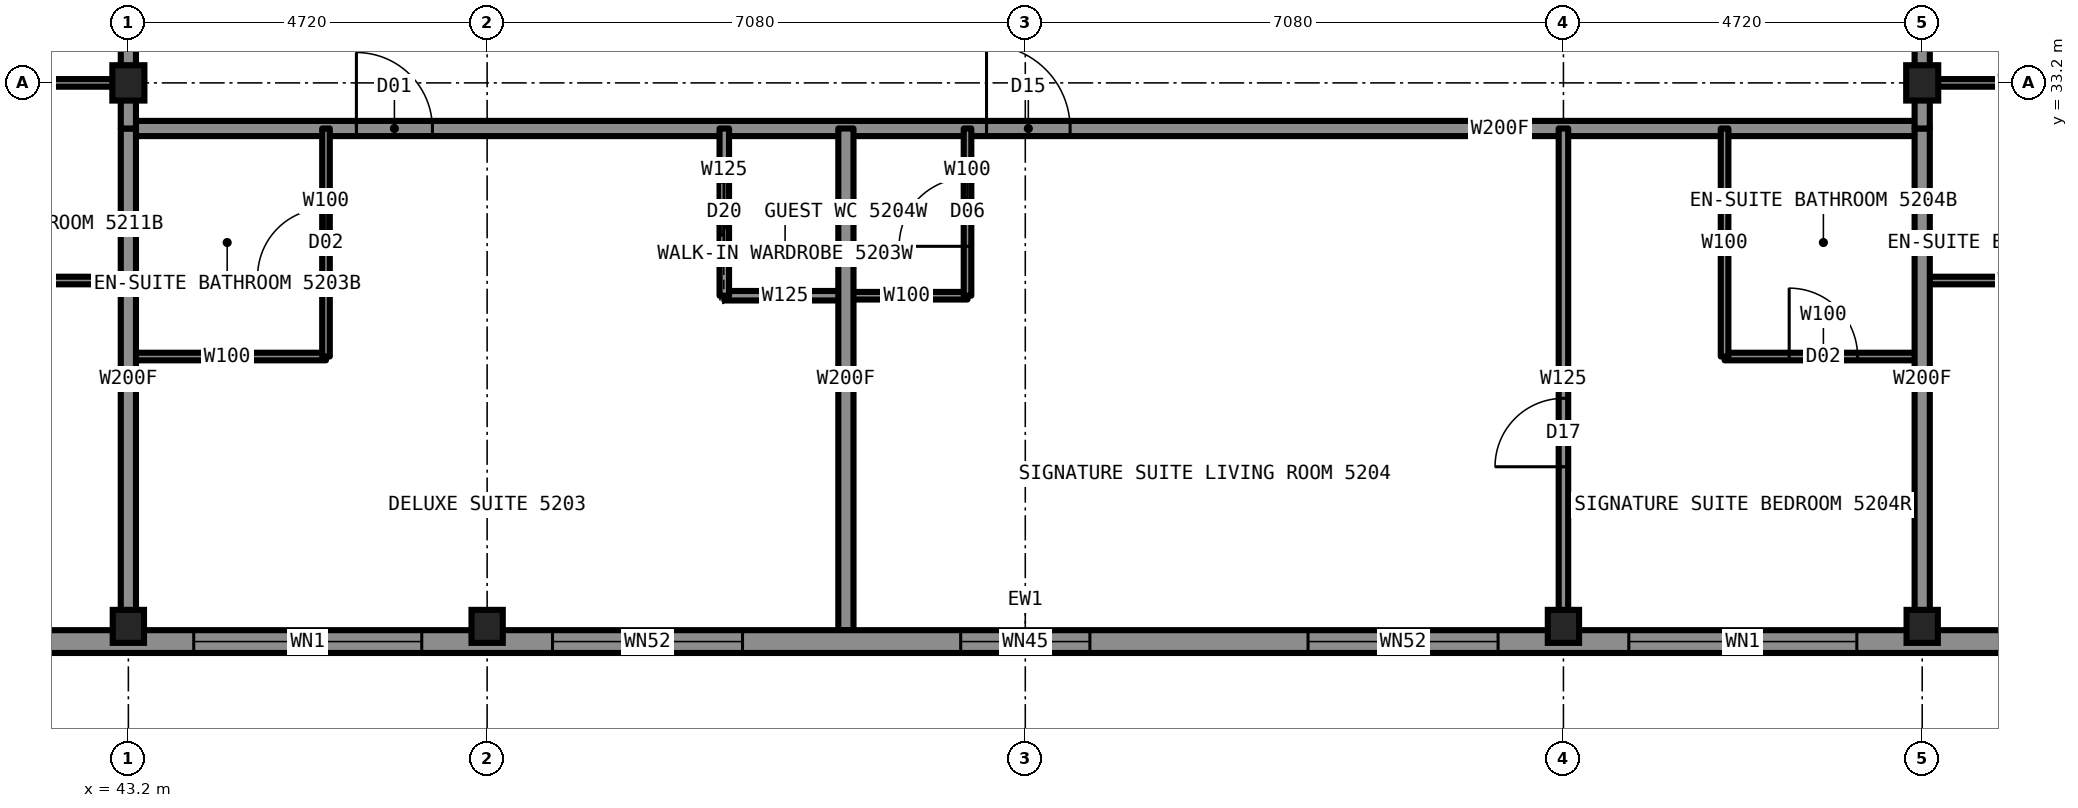
"""IFC4 building model, lengths in metres.
Left out: names, types, materials, properties, quantities, classifications, styles, units other than length and angle.
Written with IfcOpenShell. Run it as: python <this file> out.ifc"""

import sys

from ifc_helpers import new_model, si_unit, direction, frame, frame_2d, origin, origin_2d, place, context, subcontext, project, spatial, rectangle, i_section, extrude, element, fill, save


model = new_model("IFC4")
c1 = context("Model", 3, precision=1e-05, world=origin(), true_north=direction((0.0, 1.0)))
c2 = subcontext(c1, "Body", "Model", "MODEL_VIEW")
j1 = project(units=[si_unit("LENGTHUNIT", "METRE"), si_unit("PLANEANGLEUNIT", "RADIAN")], contexts=[c1])
p1 = place(None, origin())
s1 = spatial("IfcSite", under=j1, at=p1, CompositionType="ELEMENT")
p2 = place(p1, origin())
s2 = spatial("IfcBuilding", under=s1, at=p2, CompositionType="ELEMENT")
p3 = place(p2, frame((0.0, 0.0, 193.3)))
s3 = spatial("IfcBuildingStorey", under=s2, at=p3, CompositionType="ELEMENT", Elevation=193.3)
for number, where, z_axis, x_axis in (
    (1, (43.2, 26.05, 0.0), (0.0, 0.0, 1.0), (1.0, 0.0, 0.0)),
    (2, (47.92, 26.05, 0.0), (0.0, 0.0, 1.0), (1.0, 0.0, 0.0)),
    (3, (62.08, 26.05, 0.0), (0.0, 0.0, 1.0), (1.0, 0.0, 0.0)),
    (4, (66.8, 26.05, 0.0), (0.0, 0.0, 1.0), (1.0, 0.0, 0.0)),
):
    element("IfcColumn", number, at=place(p3, frame(where, z_axis=z_axis, x_axis=x_axis)), inside=s3, PredefinedType="COLUMN", context=c2, shape_type="SweptSolid", body=[
        extrude(i_section(OverallWidth=0.411, OverallDepth=0.434, WebThickness=0.036, FlangeThickness=0.057, at=origin_2d()), origin(), (0.0, 0.0, 1.0), 3.5),
    ])
for number, where, z_axis, x_axis in (
    (5, (43.2, 33.2, 0.0), (0.0, 0.0, 1.0), (1.0, 0.0, 0.0)),
    (6, (66.8, 33.2, 0.0), (0.0, 0.0, 1.0), (1.0, 0.0, 0.0)),
):
    element("IfcColumn", number, at=place(p3, frame(where, z_axis=z_axis, x_axis=x_axis)), inside=s3, PredefinedType="COLUMN", context=c2, shape_type="SweptSolid", body=[
        extrude(i_section(OverallWidth=0.422, OverallDepth=0.465, WebThickness=0.045, FlangeThickness=0.073, at=origin_2d()), origin(), (0.0, 0.0, 1.0), 3.5),
    ])
for number, where, z_axis, x_axis in (
    (7, (40.6, 33.2, 0.0), (0.0, 0.0, 1.0), (1.0, 0.0, 0.0)),
    (8, (66.8, 33.2, 0.0), (0.0, 0.0, 1.0), (1.0, 0.0, 0.0)),
):
    element("IfcWall", number, at=place(p3, frame(where, z_axis=z_axis, x_axis=x_axis)), inside=s3, PredefinedType="PARTITIONING", context=c2, shape_type="SweptSolid", body=[
        extrude(rectangle(XDim=2.6, YDim=0.1, at=frame_2d((1.3, 0.0))), origin(), (0.0, 0.0, 1.0), 2.573),
    ])
p4 = place(p3, frame((43.2, 32.6, 0.0), z_axis=(0.0, 0.0, 1.0), x_axis=(1.0, 0.0, 0.0)))
e9 = element("IfcWall", 9, at=p4, inside=s3, PredefinedType="PARTITIONING", context=c2, shape_type="SweptSolid", body=[
    extrude(rectangle(XDim=23.6, YDim=0.2, at=frame_2d((11.8, 0.0))), origin(), (0.0, 0.0, 1.0), 3.33),
])
p5 = place(p4, frame((3.0, 0.0, 0.0)))
e10 = element("IfcOpeningElement", 10, at=p5, cuts=e9, PredefinedType="OPENING", context=c2, shape_type="SweptSolid", body=[
    extrude(rectangle(XDim=1.0, YDim=2.2, at=frame_2d((0.5, 1.1))), frame((0.0, 0.11, 0.0), z_axis=(0.0, -1.0, 0.0), x_axis=(1.0, 0.0, 0.0)), (0.0, 0.0, 1.0), 0.22),
])
p6 = place(p4, frame((11.29, 0.0, 0.0)))
e11 = element("IfcOpeningElement", 11, at=p6, cuts=e9, PredefinedType="OPENING", context=c2, shape_type="SweptSolid", body=[
    extrude(rectangle(XDim=1.1, YDim=2.2, at=frame_2d((0.55, 1.1))), frame((0.0, 0.11, 0.0), z_axis=(0.0, -1.0, 0.0), x_axis=(1.0, 0.0, 0.0)), (0.0, 0.0, 1.0), 0.22),
])
for number, where, z_axis, x_axis in (
    (12, (40.6, 30.6, 0.0), (0.0, 0.0, 1.0), (1.0, 0.0, 0.0)),
    (13, (66.8, 30.6, 0.0), (0.0, 0.0, 1.0), (1.0, 0.0, 0.0)),
):
    element("IfcWall", number, at=place(p3, frame(where, z_axis=z_axis, x_axis=x_axis)), inside=s3, PredefinedType="PARTITIONING", context=c2, shape_type="SweptSolid", body=[
        extrude(rectangle(XDim=2.6, YDim=0.1, at=frame_2d((1.3, 0.0))), origin(), (0.0, 0.0, 1.0), 3.33),
    ])
p7 = place(p3, frame((52.64, 30.4, 0.0), z_axis=(0.0, 0.0, 1.0), x_axis=(1.0, 0.0, 0.0)))
e14 = element("IfcWall", 14, at=p7, inside=s3, PredefinedType="PARTITIONING", context=c2, shape_type="SweptSolid", body=[
    extrude(rectangle(XDim=1.6, YDim=0.1, at=frame_2d((0.8, 0.0))), origin(), (0.0, 0.0, 1.0), 3.33),
])
p8 = place(p3, frame((51.04, 30.4, 0.0), z_axis=(0.0, 0.0, 1.0), x_axis=(1.0, 0.0, 0.0)))
e15 = element("IfcWall", 15, at=p8, inside=s3, PredefinedType="PARTITIONING", context=c2, shape_type="SweptSolid", body=[
    extrude(rectangle(XDim=1.6, YDim=0.125, at=frame_2d((0.8, 0.0))), origin(), (0.0, 0.0, 1.0), 3.33),
])
p9 = place(p3, frame((43.2, 29.6, 0.0), z_axis=(0.0, 0.0, 1.0), x_axis=(1.0, 0.0, 0.0)))
e16 = element("IfcWall", 16, at=p9, inside=s3, PredefinedType="PARTITIONING", context=c2, shape_type="SweptSolid", body=[
    extrude(rectangle(XDim=2.6, YDim=0.1, at=frame_2d((1.3, 0.0))), origin(), (0.0, 0.0, 1.0), 3.33),
])
p10 = place(p3, frame((64.2, 29.6, 0.0), z_axis=(0.0, 0.0, 1.0), x_axis=(1.0, 0.0, 0.0)))
e17 = element("IfcWall", 17, at=p10, inside=s3, PredefinedType="PARTITIONING", context=c2, shape_type="SweptSolid", body=[
    extrude(rectangle(XDim=2.6, YDim=0.1, at=frame_2d((1.3, 0.0))), origin(), (0.0, 0.0, 1.0), 3.33),
])
p11 = place(p10, frame((0.85, 0.0, 0.0)))
e18 = element("IfcOpeningElement", 18, at=p11, cuts=e17, PredefinedType="OPENING", context=c2, shape_type="SweptSolid", body=[
    extrude(rectangle(XDim=0.9, YDim=2.1, at=frame_2d((0.45, 1.05))), frame((0.0, 0.06, 0.0), z_axis=(0.0, -1.0, 0.0), x_axis=(1.0, 0.0, 0.0)), (0.0, 0.0, 1.0), 0.12),
])
p12 = place(p3, frame((54.24, 30.4, 0.0), z_axis=(0.0, 0.0, 1.0), x_axis=(0.0, 1.0, 0.0)))
e19 = element("IfcWall", 19, at=p12, inside=s3, PredefinedType="PARTITIONING", context=c2, shape_type="SweptSolid", body=[
    extrude(rectangle(XDim=2.2, YDim=0.1, at=frame_2d((1.1, 0.0))), origin(), (0.0, 0.0, 1.0), 3.33),
])
p13 = place(p12, frame((0.65, 0.0, 0.0)))
e20 = element("IfcOpeningElement", 20, at=p13, cuts=e19, PredefinedType="OPENING", context=c2, shape_type="SweptSolid", body=[
    extrude(rectangle(XDim=0.9, YDim=2.1, at=frame_2d((0.45, 1.05))), frame((0.0, 0.06, 0.0), z_axis=(0.0, -1.0, 0.0), x_axis=(1.0, 0.0, 0.0)), (0.0, 0.0, 1.0), 0.12),
])
p14 = place(p3, frame((43.2, 33.22, 0.0), z_axis=(0.0, 0.0, 1.0), x_axis=(0.0, 1.0, 0.0)))
e21 = element("IfcWall", 21, at=p14, inside=s3, PredefinedType="PARTITIONING", context=c2, shape_type="SweptSolid", body=[
    extrude(rectangle(XDim=23.56, YDim=0.2, at=frame_2d((11.78, 0.0))), origin(), (0.0, 0.0, 1.0), 3.33),
])
p15 = place(p14, frame((7.25, 0.0, 0.0)))
e22 = element("IfcOpeningElement", 22, at=p15, cuts=e21, PredefinedType="OPENING", context=c2, shape_type="SweptSolid", body=[
    extrude(rectangle(XDim=1.0, YDim=2.2, at=frame_2d((0.5, 1.1))), frame((0.0, 0.11, 0.0), z_axis=(0.0, -1.0, 0.0), x_axis=(1.0, 0.0, 0.0)), (0.0, 0.0, 1.0), 0.22),
])
p16 = place(p14, frame((12.42, 0.0, 0.0)))
e23 = element("IfcOpeningElement", 23, at=p16, cuts=e21, PredefinedType="OPENING", context=c2, shape_type="SweptSolid", body=[
    extrude(rectangle(XDim=1.0, YDim=2.2, at=frame_2d((0.5, 1.1))), frame((0.0, 0.11, 0.0), z_axis=(0.0, -1.0, 0.0), x_axis=(1.0, 0.0, 0.0)), (0.0, 0.0, 1.0), 0.22),
])
p17 = place(p14, frame((22.03, 0.0, 0.0)))
e24 = element("IfcOpeningElement", 24, at=p17, cuts=e21, PredefinedType="OPENING", context=c2, shape_type="SweptSolid", body=[
    extrude(rectangle(XDim=1.1, YDim=2.2, at=frame_2d((0.55, 1.1))), frame((0.0, 0.11, 0.0), z_axis=(0.0, -1.0, 0.0), x_axis=(1.0, 0.0, 0.0)), (0.0, 0.0, 1.0), 0.22),
])
p18 = place(p14, frame((0.63, 0.0, 0.0)))
e25 = element("IfcOpeningElement", 25, at=p18, cuts=e21, PredefinedType="OPENING", context=c2, shape_type="SweptSolid", body=[
    extrude(rectangle(XDim=1.1, YDim=2.2, at=frame_2d((0.55, 1.1))), frame((0.0, 0.11, 0.0), z_axis=(0.0, -1.0, 0.0), x_axis=(1.0, 0.0, 0.0)), (0.0, 0.0, 1.0), 0.22),
])
p19 = place(p3, frame((43.2, 26.0, 0.0), z_axis=(0.0, 0.0, 1.0), x_axis=(0.0, 1.0, 0.0)))
e26 = element("IfcWall", 26, at=p19, inside=s3, PredefinedType="PARTITIONING", context=c2, shape_type="SweptSolid", body=[
    extrude(rectangle(XDim=6.6, YDim=0.2, at=frame_2d((3.3, 0.0))), origin(), (0.0, 0.0, 1.0), 2.573),
])
p20 = place(p3, frame((52.64, 26.0, 0.0), z_axis=(0.0, 0.0, 1.0), x_axis=(0.0, 1.0, 0.0)))
e27 = element("IfcWall", 27, at=p20, inside=s3, PredefinedType="PARTITIONING", context=c2, shape_type="SweptSolid", body=[
    extrude(rectangle(XDim=6.6, YDim=0.2, at=frame_2d((3.3, 0.0))), origin(), (0.0, 0.0, 1.0), 3.33),
])
p21 = place(p3, frame((51.04, 30.4, 0.0), z_axis=(0.0, 0.0, 1.0), x_axis=(0.0, 1.0, 0.0)))
e28 = element("IfcWall", 28, at=p21, inside=s3, PredefinedType="PARTITIONING", context=c2, shape_type="SweptSolid", body=[
    extrude(rectangle(XDim=2.2, YDim=0.125, at=frame_2d((1.1, 0.0))), origin(), (0.0, 0.0, 1.0), 3.33),
])
p22 = place(p21, frame((0.7, 0.0, 0.0)))
e29 = element("IfcOpeningElement", 29, at=p22, cuts=e28, PredefinedType="OPENING", context=c2, shape_type="SweptSolid", body=[
    extrude(rectangle(XDim=0.8, YDim=2.1, at=frame_2d((0.4, 1.05))), frame((0.0, 0.073, 0.0), z_axis=(0.0, -1.0, 0.0), x_axis=(1.0, 0.0, 0.0)), (0.0, 0.0, 1.0), 0.145),
])
p23 = place(p3, frame((45.8, 29.6, 0.0), z_axis=(0.0, 0.0, 1.0), x_axis=(0.0, 1.0, 0.0)))
e30 = element("IfcWall", 30, at=p23, inside=s3, PredefinedType="PARTITIONING", context=c2, shape_type="SweptSolid", body=[
    extrude(rectangle(XDim=3.0, YDim=0.1, at=frame_2d((1.5, 0.0))), origin(), (0.0, 0.0, 1.0), 3.33),
])
p24 = place(p23, frame((1.05, 0.0, 0.0)))
e31 = element("IfcOpeningElement", 31, at=p24, cuts=e30, PredefinedType="OPENING", context=c2, shape_type="SweptSolid", body=[
    extrude(rectangle(XDim=0.9, YDim=2.1, at=frame_2d((0.45, 1.05))), frame((0.0, 0.06, 0.0), z_axis=(0.0, -1.0, 0.0), x_axis=(1.0, 0.0, 0.0)), (0.0, 0.0, 1.0), 0.12),
])
p25 = place(p3, frame((66.8, 33.22, 0.0), z_axis=(0.0, 0.0, 1.0), x_axis=(0.0, 1.0, 0.0)))
e32 = element("IfcWall", 32, at=p25, inside=s3, PredefinedType="PARTITIONING", context=c2, shape_type="SweptSolid", body=[
    extrude(rectangle(XDim=23.56, YDim=0.2, at=frame_2d((11.78, 0.0))), origin(), (0.0, 0.0, 1.0), 3.33),
])
p26 = place(p25, frame((7.85, 0.0, 0.0)))
e33 = element("IfcOpeningElement", 33, at=p26, cuts=e32, PredefinedType="OPENING", context=c2, shape_type="SweptSolid", body=[
    extrude(rectangle(XDim=1.0, YDim=2.2, at=frame_2d((0.5, 1.1))), frame((0.0, 0.11, 0.0), z_axis=(0.0, -1.0, 0.0), x_axis=(1.0, 0.0, 0.0)), (0.0, 0.0, 1.0), 0.22),
])
p27 = place(p25, frame((12.42, 0.0, 0.0)))
e34 = element("IfcOpeningElement", 34, at=p27, cuts=e32, PredefinedType="OPENING", context=c2, shape_type="SweptSolid", body=[
    extrude(rectangle(XDim=1.0, YDim=2.2, at=frame_2d((0.5, 1.1))), frame((0.0, 0.11, 0.0), z_axis=(0.0, -1.0, 0.0), x_axis=(1.0, 0.0, 0.0)), (0.0, 0.0, 1.0), 0.22),
])
p28 = place(p25, frame((22.03, 0.0, 0.0)))
e35 = element("IfcOpeningElement", 35, at=p28, cuts=e32, PredefinedType="OPENING", context=c2, shape_type="SweptSolid", body=[
    extrude(rectangle(XDim=1.1, YDim=2.2, at=frame_2d((0.55, 1.1))), frame((0.0, 0.11, 0.0), z_axis=(0.0, -1.0, 0.0), x_axis=(1.0, 0.0, 0.0)), (0.0, 0.0, 1.0), 0.22),
])
p29 = place(p25, frame((0.63, 0.0, 0.0)))
e36 = element("IfcOpeningElement", 36, at=p29, cuts=e32, PredefinedType="OPENING", context=c2, shape_type="SweptSolid", body=[
    extrude(rectangle(XDim=1.1, YDim=2.2, at=frame_2d((0.55, 1.1))), frame((0.0, 0.11, 0.0), z_axis=(0.0, -1.0, 0.0), x_axis=(1.0, 0.0, 0.0)), (0.0, 0.0, 1.0), 0.22),
])
p30 = place(p3, frame((66.8, 26.0, 0.0), z_axis=(0.0, 0.0, 1.0), x_axis=(0.0, 1.0, 0.0)))
e37 = element("IfcWall", 37, at=p30, inside=s3, PredefinedType="PARTITIONING", context=c2, shape_type="SweptSolid", body=[
    extrude(rectangle(XDim=6.6, YDim=0.2, at=frame_2d((3.3, 0.0))), origin(), (0.0, 0.0, 1.0), 2.573),
])
p31 = place(p3, frame((62.08, 26.0, 0.0), z_axis=(0.0, 0.0, 1.0), x_axis=(0.0, 1.0, 0.0)))
e38 = element("IfcWall", 38, at=p31, inside=s3, PredefinedType="PARTITIONING", context=c2, shape_type="SweptSolid", body=[
    extrude(rectangle(XDim=6.6, YDim=0.125, at=frame_2d((3.3, 0.0))), origin(), (0.0, 0.0, 1.0), 2.573),
])
p32 = place(p31, frame((2.15, 0.0, 0.0)))
e39 = element("IfcOpeningElement", 39, at=p32, cuts=e38, PredefinedType="OPENING", context=c2, shape_type="SweptSolid", body=[
    extrude(rectangle(XDim=0.9, YDim=2.2, at=frame_2d((0.45, 1.1))), frame((0.0, 0.073, 0.0), z_axis=(0.0, -1.0, 0.0), x_axis=(1.0, 0.0, 0.0)), (0.0, 0.0, 1.0), 0.145),
])
p33 = place(p3, frame((64.2, 29.6, 0.0), z_axis=(0.0, 0.0, 1.0), x_axis=(0.0, 1.0, 0.0)))
e40 = element("IfcWall", 40, at=p33, inside=s3, PredefinedType="PARTITIONING", context=c2, shape_type="SweptSolid", body=[
    extrude(rectangle(XDim=3.0, YDim=0.1, at=frame_2d((1.5, 0.0))), origin(), (0.0, 0.0, 1.0), 3.33),
])
p34 = place(p3, frame((41.2, 25.85, 0.0), z_axis=(0.0, 0.0, 1.0), x_axis=(1.0, 0.0, 0.0)))
e41 = element("IfcWall", 41, at=p34, inside=s3, PredefinedType="SOLIDWALL", context=c2, shape_type="SweptSolid", body=[
    extrude(rectangle(XDim=27.6, YDim=0.3, at=frame_2d((13.8, 0.0))), origin(), (0.0, 0.0, 1.0), 2.83),
])
p35 = place(p34, frame((2.86, 0.0, 0.3)))
e42 = element("IfcOpeningElement", 42, at=p35, cuts=e41, PredefinedType="OPENING", context=c2, shape_type="SweptSolid", body=[
    extrude(rectangle(XDim=3.0, YDim=2.0, at=frame_2d((1.5, 1.0))), frame((0.0, 0.16, 0.0), z_axis=(0.0, -1.0, 0.0), x_axis=(1.0, 0.0, 0.0)), (0.0, 0.0, 1.0), 0.32),
])
p36 = place(p34, frame((7.58, 0.0, 0.3)))
e43 = element("IfcOpeningElement", 43, at=p36, cuts=e41, PredefinedType="OPENING", context=c2, shape_type="SweptSolid", body=[
    extrude(rectangle(XDim=2.5, YDim=2.0, at=frame_2d((1.25, 1.0))), frame((0.0, 0.16, 0.0), z_axis=(0.0, -1.0, 0.0), x_axis=(1.0, 0.0, 0.0)), (0.0, 0.0, 1.0), 0.32),
])
p37 = place(p34, frame((12.95, 0.0, 1.0)))
e44 = element("IfcOpeningElement", 44, at=p37, cuts=e41, PredefinedType="OPENING", context=c2, shape_type="SweptSolid", body=[
    extrude(rectangle(XDim=1.7, YDim=1.3, at=frame_2d((0.85, 0.65))), frame((0.0, 0.16, 0.0), z_axis=(0.0, -1.0, 0.0), x_axis=(1.0, 0.0, 0.0)), (0.0, 0.0, 1.0), 0.32),
])
p38 = place(p34, frame((17.52, 0.0, 0.3)))
e45 = element("IfcOpeningElement", 45, at=p38, cuts=e41, PredefinedType="OPENING", context=c2, shape_type="SweptSolid", body=[
    extrude(rectangle(XDim=2.5, YDim=2.0, at=frame_2d((1.25, 1.0))), frame((0.0, 0.16, 0.0), z_axis=(0.0, -1.0, 0.0), x_axis=(1.0, 0.0, 0.0)), (0.0, 0.0, 1.0), 0.32),
])
p39 = place(p34, frame((21.74, 0.0, 0.3)))
e46 = element("IfcOpeningElement", 46, at=p39, cuts=e41, PredefinedType="OPENING", context=c2, shape_type="SweptSolid", body=[
    extrude(rectangle(XDim=3.0, YDim=2.0, at=frame_2d((1.5, 1.0))), frame((0.0, 0.16, 0.0), z_axis=(0.0, -1.0, 0.0), x_axis=(1.0, 0.0, 0.0)), (0.0, 0.0, 1.0), 0.32),
])
for number, where, z_axis, x_axis in (
    (47, (43.2, 32.6, 0.0), (0.0, 0.0, 1.0), (0.0, 1.0, 0.0)),
    (48, (66.8, 32.6, 0.0), (0.0, 0.0, 1.0), (0.0, 1.0, 0.0)),
):
    element("IfcWall", number, at=place(p3, frame(where, z_axis=z_axis, x_axis=x_axis)), inside=s3, PredefinedType="PARTITIONING", context=c2, shape_type="SweptSolid", body=[
        extrude(rectangle(XDim=0.62, YDim=0.2, at=frame_2d((0.31, 0.0))), origin(), (0.0, 0.0, 1.0), 2.573),
    ])
p40 = place(p5, origin())
e49 = element("IfcDoor", 49, at=p40, inside=s3, OperationType="SINGLE_SWING_LEFT", PredefinedType="DOOR", context=c2, shape_type="SweptSolid", body=[
    extrude(rectangle(XDim=1.0, YDim=2.2, at=frame_2d((0.5, 1.1))), frame((0.0, 0.025, 0.0), z_axis=(0.0, -1.0, 0.0), x_axis=(1.0, 0.0, 0.0)), (0.0, 0.0, 1.0), 0.05),
])
fill(e10, e49)
p41 = place(p24, origin())
e50 = element("IfcDoor", 50, at=p41, inside=s3, OperationType="SINGLE_SWING_RIGHT", PredefinedType="DOOR", context=c2, shape_type="SweptSolid", body=[
    extrude(rectangle(XDim=0.9, YDim=2.1, at=frame_2d((0.45, 1.05))), frame((0.0, 0.025, 0.0), z_axis=(0.0, -1.0, 0.0), x_axis=(1.0, 0.0, 0.0)), (0.0, 0.0, 1.0), 0.05),
])
fill(e31, e50)
p42 = place(p22, origin())
e51 = element("IfcDoor", 51, at=p42, inside=s3, OperationType="SLIDING_TO_LEFT", PredefinedType="DOOR", context=c2, shape_type="SweptSolid", body=[
    extrude(rectangle(XDim=0.8, YDim=2.1, at=frame_2d((0.4, 1.05))), frame((0.0, 0.025, 0.0), z_axis=(0.0, -1.0, 0.0), x_axis=(1.0, 0.0, 0.0)), (0.0, 0.0, 1.0), 0.05),
])
fill(e29, e51)
p43 = place(p6, origin())
e52 = element("IfcDoor", 52, at=p43, inside=s3, OperationType="SINGLE_SWING_LEFT", PredefinedType="DOOR", context=c2, shape_type="SweptSolid", body=[
    extrude(rectangle(XDim=1.1, YDim=2.2, at=frame_2d((0.55, 1.1))), frame((0.0, 0.025, 0.0), z_axis=(0.0, -1.0, 0.0), x_axis=(1.0, 0.0, 0.0)), (0.0, 0.0, 1.0), 0.05),
])
fill(e11, e52)
p44 = place(p11, origin())
e53 = element("IfcDoor", 53, at=p44, inside=s3, OperationType="SINGLE_SWING_RIGHT", PredefinedType="DOOR", context=c2, shape_type="SweptSolid", body=[
    extrude(rectangle(XDim=0.9, YDim=2.1, at=frame_2d((0.45, 1.05))), frame((0.0, 0.025, 0.0), z_axis=(0.0, -1.0, 0.0), x_axis=(1.0, 0.0, 0.0)), (0.0, 0.0, 1.0), 0.05),
])
fill(e18, e53)
p45 = place(p32, origin())
e54 = element("IfcDoor", 54, at=p45, inside=s3, OperationType="SINGLE_SWING_LEFT", PredefinedType="DOOR", context=c2, shape_type="SweptSolid", body=[
    extrude(rectangle(XDim=0.9, YDim=2.2, at=frame_2d((0.45, 1.1))), frame((0.0, 0.025, 0.0), z_axis=(0.0, -1.0, 0.0), x_axis=(1.0, 0.0, 0.0)), (0.0, 0.0, 1.0), 0.05),
])
fill(e39, e54)
p46 = place(p13, origin())
e55 = element("IfcDoor", 55, at=p46, inside=s3, OperationType="SINGLE_SWING_LEFT", PredefinedType="DOOR", context=c2, shape_type="SweptSolid", body=[
    extrude(rectangle(XDim=0.9, YDim=2.1, at=frame_2d((0.45, 1.05))), frame((0.0, 0.025, 0.0), z_axis=(0.0, -1.0, 0.0), x_axis=(1.0, 0.0, 0.0)), (0.0, 0.0, 1.0), 0.05),
])
fill(e20, e55)
p47 = place(p35, origin())
e56 = element("IfcWindow", 56, at=p47, inside=s3, PartitioningType="SINGLE_PANEL", PredefinedType="WINDOW", context=c2, shape_type="SweptSolid", body=[
    extrude(rectangle(XDim=3.0, YDim=2.0, at=frame_2d((1.5, 1.0))), frame((0.0, 0.13, 0.0), z_axis=(0.0, -1.0, 0.0), x_axis=(1.0, 0.0, 0.0)), (0.0, 0.0, 1.0), 0.06),
])
fill(e42, e56)
p48 = place(p36, origin())
e57 = element("IfcWindow", 57, at=p48, inside=s3, PartitioningType="SINGLE_PANEL", PredefinedType="WINDOW", context=c2, shape_type="SweptSolid", body=[
    extrude(rectangle(XDim=2.5, YDim=2.0, at=frame_2d((1.25, 1.0))), frame((0.0, 0.13, 0.0), z_axis=(0.0, -1.0, 0.0), x_axis=(1.0, 0.0, 0.0)), (0.0, 0.0, 1.0), 0.06),
])
fill(e43, e57)
p49 = place(p37, origin())
e58 = element("IfcWindow", 58, at=p49, inside=s3, PartitioningType="SINGLE_PANEL", PredefinedType="WINDOW", context=c2, shape_type="SweptSolid", body=[
    extrude(rectangle(XDim=1.7, YDim=1.3, at=frame_2d((0.85, 0.65))), frame((0.0, 0.13, 0.0), z_axis=(0.0, -1.0, 0.0), x_axis=(1.0, 0.0, 0.0)), (0.0, 0.0, 1.0), 0.06),
])
fill(e44, e58)
p50 = place(p38, origin())
e59 = element("IfcWindow", 59, at=p50, inside=s3, PartitioningType="SINGLE_PANEL", PredefinedType="WINDOW", context=c2, shape_type="SweptSolid", body=[
    extrude(rectangle(XDim=2.5, YDim=2.0, at=frame_2d((1.25, 1.0))), frame((0.0, 0.13, 0.0), z_axis=(0.0, -1.0, 0.0), x_axis=(1.0, 0.0, 0.0)), (0.0, 0.0, 1.0), 0.06),
])
fill(e45, e59)
p51 = place(p39, origin())
e60 = element("IfcWindow", 60, at=p51, inside=s3, PartitioningType="SINGLE_PANEL", PredefinedType="WINDOW", context=c2, shape_type="SweptSolid", body=[
    extrude(rectangle(XDim=3.0, YDim=2.0, at=frame_2d((1.5, 1.0))), frame((0.0, 0.13, 0.0), z_axis=(0.0, -1.0, 0.0), x_axis=(1.0, 0.0, 0.0)), (0.0, 0.0, 1.0), 0.06),
])
fill(e46, e60)
save(model, sys.argv[1])
